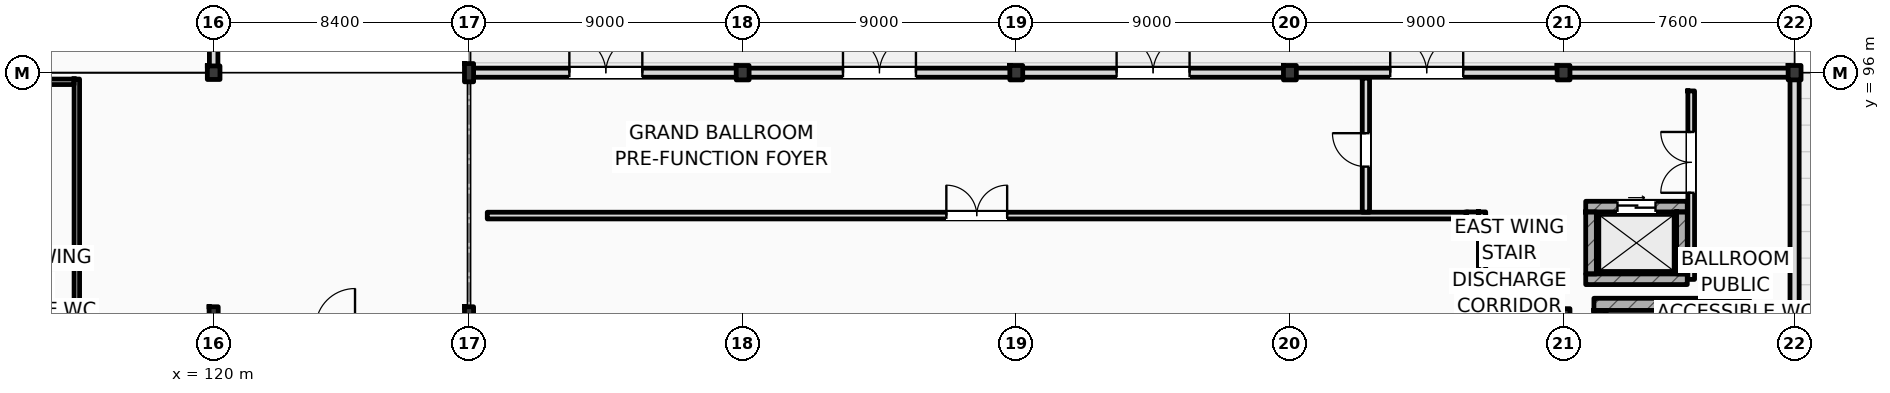
"""IFC4 building model, lengths in metres.
Left out: names, types, materials, properties, quantities, classifications, styles, units other than length and angle.
Written with IfcOpenShell. Run it as: python <this file> out.ifc"""

import sys

from ifc_helpers import new_model, si_unit, direction, frame, frame_2d, origin, origin_2d, place, context, subcontext, project, spatial, rectangle, i_section, extrude, element, fill, save


model = new_model("IFC4")
c1 = context("Model", 3, precision=1e-05, world=origin(), true_north=direction((0.0, 1.0)))
c2 = subcontext(c1, "Body", "Model", "MODEL_VIEW")
j1 = project(units=[si_unit("LENGTHUNIT", "METRE"), si_unit("PLANEANGLEUNIT", "RADIAN")], contexts=[c1])
p1 = place(None, origin())
s1 = spatial("IfcSite", under=j1, at=p1, CompositionType="ELEMENT")
p2 = place(p1, origin())
s2 = spatial("IfcBuilding", under=s1, at=p2, CompositionType="ELEMENT")
p3 = place(p2, origin())
s3 = spatial("IfcBuildingStorey", under=s2, at=p3, CompositionType="ELEMENT", Elevation=0.0)
p4 = place(p3, frame((120.0, 96.0, 0.0), z_axis=(0.0, 0.0, 1.0), x_axis=(1.0, 0.0, 0.0)))
e1 = element("IfcColumn", 1, at=p4, inside=s3, PredefinedType="COLUMN", context=c2, shape_type="SweptSolid", body=[
    extrude(i_section(OverallWidth=0.416, OverallDepth=0.446, WebThickness=0.036, FlangeThickness=0.048, FilletRadius=0.015, at=origin_2d()), origin(), (0.0, 0.0, 1.0), 6.0),
])
for number, where, z_axis, x_axis in (
    (2, (120.0, 88.0, 0.0), (0.0, 0.0, 1.0), (1.0, 0.0, 0.0)),
    (3, (128.4, 88.0, 0.0), (0.0, 0.0, 1.0), (1.0, 0.0, 0.0)),
    (4, (128.4, 96.0, 0.0), (0.0, 0.0, 1.0), (1.0, 0.0, 0.0)),
):
    element("IfcColumn", number, at=place(p3, frame(where, z_axis=z_axis, x_axis=x_axis)), inside=s3, PredefinedType="COLUMN", context=c2, shape_type="SweptSolid", body=[
        extrude(i_section(OverallWidth=0.3, OverallDepth=0.6, WebThickness=0.015, FlangeThickness=0.03, FilletRadius=0.027, at=origin_2d()), origin(), (0.0, 0.0, 1.0), 6.0),
    ])
for number, where, z_axis, x_axis in (
    (5, (164.4, 88.0, 0.0), (0.0, 0.0, 1.0), (1.0, 0.0, 0.0)),
    (6, (164.4, 96.0, 0.0), (0.0, 0.0, 1.0), (1.0, 0.0, 0.0)),
    (7, (172.0, 88.0, 0.0), (0.0, 0.0, 1.0), (1.0, 0.0, 0.0)),
    (8, (172.0, 96.0, 0.0), (0.0, 0.0, 1.0), (1.0, 0.0, 0.0)),
    (9, (137.4, 96.0, 0.0), (0.0, 0.0, 1.0), (1.0, 0.0, 0.0)),
    (10, (146.4, 96.0, 0.0), (0.0, 0.0, 1.0), (1.0, 0.0, 0.0)),
    (11, (155.4, 96.0, 0.0), (0.0, 0.0, 1.0), (1.0, 0.0, 0.0)),
):
    element("IfcColumn", number, at=place(p3, frame(where, z_axis=z_axis, x_axis=x_axis)), inside=s3, PredefinedType="COLUMN", context=c2, shape_type="SweptSolid", body=[
        extrude(i_section(OverallWidth=0.424, OverallDepth=0.474, WebThickness=0.045, FlangeThickness=0.055, FilletRadius=0.015, at=origin_2d()), origin(), (0.0, 0.0, 1.0), 6.0),
    ])
p5 = place(p3, frame((165.4, 88.38, 0.0), z_axis=(0.0, 0.0, 1.0), x_axis=(1.0, 0.0, 0.0)))
e12 = element("IfcWall", 12, at=p5, inside=s3, PredefinedType="SHEAR", context=c2, shape_type="SweptSolid", body=[
    extrude(rectangle(XDim=5.1, YDim=0.4, at=frame_2d((2.55, 0.0))), origin(), (0.0, 0.0, 1.0), 6.0),
])
p6 = place(p3, frame((165.6, 79.6, 0.0), z_axis=(0.0, 0.0, 1.0), x_axis=(0.0, 1.0, 0.0)))
e13 = element("IfcWall", 13, at=p6, inside=s3, PredefinedType="SHEAR", context=c2, shape_type="SweptSolid", body=[
    extrude(rectangle(XDim=8.58, YDim=0.4, at=frame_2d((4.29, 0.0))), origin(), (0.0, 0.0, 1.0), 6.0),
])
p7 = place(p6, frame((0.225, 0.0, 0.0)))
e14 = element("IfcOpeningElement", 14, at=p7, cuts=e13, PredefinedType="OPENING", context=c2, shape_type="SweptSolid", body=[
    extrude(rectangle(XDim=1.6, YDim=2.2, at=frame_2d((0.8, 1.1))), frame((0.0, 0.21, 0.0), z_axis=(0.0, -1.0, 0.0), x_axis=(1.0, 0.0, 0.0)), (0.0, 0.0, 1.0), 0.42),
])
p8 = place(p3, frame((170.3, 79.6, 0.0), z_axis=(0.0, 0.0, 1.0), x_axis=(0.0, 1.0, 0.0)))
e15 = element("IfcWall", 15, at=p8, inside=s3, PredefinedType="SHEAR", context=c2, shape_type="SweptSolid", body=[
    extrude(rectangle(XDim=8.58, YDim=0.4, at=frame_2d((4.29, 0.0))), origin(), (0.0, 0.0, 1.0), 6.0),
])
p9 = place(p3, frame((128.4, 96.0, 0.0), z_axis=(0.0, 0.0, 1.0), x_axis=(1.0, 0.0, 0.0)))
e16 = element("IfcWall", 16, at=p9, inside=s3, PredefinedType="STANDARD", context=c2, shape_type="SweptSolid", body=[
    extrude(rectangle(XDim=9.0, YDim=0.3, at=frame_2d((4.5, 0.0))), origin(), (0.0, 0.0, 1.0), 5.09),
])
p10 = place(p9, frame((3.3, 0.0, 0.0)))
e17 = element("IfcOpeningElement", 17, at=p10, cuts=e16, PredefinedType="OPENING", context=c2, shape_type="SweptSolid", body=[
    extrude(rectangle(XDim=2.4, YDim=2.6, at=frame_2d((1.2, 1.3))), frame((0.0, 0.16, 0.0), z_axis=(0.0, -1.0, 0.0), x_axis=(1.0, 0.0, 0.0)), (0.0, 0.0, 1.0), 0.32),
])
p11 = place(p3, frame((137.4, 96.0, 0.0), z_axis=(0.0, 0.0, 1.0), x_axis=(1.0, 0.0, 0.0)))
e18 = element("IfcWall", 18, at=p11, inside=s3, PredefinedType="STANDARD", context=c2, shape_type="SweptSolid", body=[
    extrude(rectangle(XDim=9.0, YDim=0.3, at=frame_2d((4.5, 0.0))), origin(), (0.0, 0.0, 1.0), 5.09),
])
p12 = place(p11, frame((3.3, 0.0, 0.0)))
e19 = element("IfcOpeningElement", 19, at=p12, cuts=e18, PredefinedType="OPENING", context=c2, shape_type="SweptSolid", body=[
    extrude(rectangle(XDim=2.4, YDim=2.6, at=frame_2d((1.2, 1.3))), frame((0.0, 0.16, 0.0), z_axis=(0.0, -1.0, 0.0), x_axis=(1.0, 0.0, 0.0)), (0.0, 0.0, 1.0), 0.32),
])
p13 = place(p3, frame((146.4, 96.0, 0.0), z_axis=(0.0, 0.0, 1.0), x_axis=(1.0, 0.0, 0.0)))
e20 = element("IfcWall", 20, at=p13, inside=s3, PredefinedType="STANDARD", context=c2, shape_type="SweptSolid", body=[
    extrude(rectangle(XDim=9.0, YDim=0.3, at=frame_2d((4.5, 0.0))), origin(), (0.0, 0.0, 1.0), 5.09),
])
p14 = place(p13, frame((3.3, 0.0, 0.0)))
e21 = element("IfcOpeningElement", 21, at=p14, cuts=e20, PredefinedType="OPENING", context=c2, shape_type="SweptSolid", body=[
    extrude(rectangle(XDim=2.4, YDim=2.6, at=frame_2d((1.2, 1.3))), frame((0.0, 0.16, 0.0), z_axis=(0.0, -1.0, 0.0), x_axis=(1.0, 0.0, 0.0)), (0.0, 0.0, 1.0), 0.32),
])
p15 = place(p3, frame((155.4, 96.0, 0.0), z_axis=(0.0, 0.0, 1.0), x_axis=(1.0, 0.0, 0.0)))
e22 = element("IfcWall", 22, at=p15, inside=s3, PredefinedType="STANDARD", context=c2, shape_type="SweptSolid", body=[
    extrude(rectangle(XDim=9.0, YDim=0.3, at=frame_2d((4.5, 0.0))), origin(), (0.0, 0.0, 1.0), 5.09),
])
p16 = place(p15, frame((3.3, 0.0, 0.0)))
e23 = element("IfcOpeningElement", 23, at=p16, cuts=e22, PredefinedType="OPENING", context=c2, shape_type="SweptSolid", body=[
    extrude(rectangle(XDim=2.4, YDim=2.6, at=frame_2d((1.2, 1.3))), frame((0.0, 0.16, 0.0), z_axis=(0.0, -1.0, 0.0), x_axis=(1.0, 0.0, 0.0)), (0.0, 0.0, 1.0), 0.32),
])
p17 = place(p3, frame((164.4, 96.0, 0.0), z_axis=(0.0, 0.0, 1.0), x_axis=(1.0, 0.0, 0.0)))
e24 = element("IfcWall", 24, at=p17, inside=s3, PredefinedType="STANDARD", context=c2, shape_type="SweptSolid", body=[
    extrude(rectangle(XDim=7.6, YDim=0.3, at=frame_2d((3.8, 0.0))), origin(), (0.0, 0.0, 1.0), 5.19),
])
p18 = place(p3, frame((172.0, 88.0, 0.0), z_axis=(0.0, 0.0, 1.0), x_axis=(0.0, 1.0, 0.0)))
e25 = element("IfcWall", 25, at=p18, inside=s3, PredefinedType="STANDARD", context=c2, shape_type="SweptSolid", body=[
    extrude(rectangle(XDim=8.0, YDim=0.3, at=frame_2d((4.0, 0.0))), origin(), (0.0, 0.0, 1.0), 5.24),
])
p19 = place(p3, frame((120.0, 96.0, 0.0), z_axis=(0.0, 0.0, 1.0), x_axis=(0.0, 1.0, 0.0)))
e26 = element("IfcWall", 26, at=p19, inside=s3, PredefinedType="STANDARD", context=c2, shape_type="SweptSolid", body=[
    extrude(rectangle(XDim=22.0, YDim=0.28, at=frame_2d((11.0, 0.0))), origin(), (0.0, 0.0, 1.0), 5.24),
])
p20 = place(p3, frame((165.13, 91.595, 0.0), z_axis=(0.0, 0.0, 1.0), x_axis=(1.0, 0.0, 0.0)))
e27 = element("IfcWall", 27, at=p20, inside=s3, PredefinedType="SHEAR", context=c2, shape_type="SweptSolid", body=[
    extrude(rectangle(XDim=3.34, YDim=0.35, at=frame_2d((1.67, 0.0))), origin(), (0.0, 0.0, 1.0), 5.7),
])
p21 = place(p20, frame((1.045, 0.0, 0.0)))
e28 = element("IfcOpeningElement", 28, at=p21, cuts=e27, PredefinedType="OPENING", context=c2, shape_type="SweptSolid", body=[
    extrude(rectangle(XDim=1.25, YDim=2.25, at=frame_2d((0.625, 1.125))), frame((0.0, 0.185, 0.0), z_axis=(0.0, -1.0, 0.0), x_axis=(1.0, 0.0, 0.0)), (0.0, 0.0, 1.0), 0.37),
])
p22 = place(p3, frame((165.13, 89.205, 0.0), z_axis=(0.0, 0.0, 1.0), x_axis=(1.0, 0.0, 0.0)))
e29 = element("IfcWall", 29, at=p22, inside=s3, PredefinedType="SHEAR", context=c2, shape_type="SweptSolid", body=[
    extrude(rectangle(XDim=3.34, YDim=0.35, at=frame_2d((1.67, 0.0))), origin(), (0.0, 0.0, 1.0), 5.7),
])
for number, where, z_axis, x_axis in (
    (30, (165.305, 89.38, 0.0), (0.0, 0.0, 1.0), (0.0, 1.0, 0.0)),
    (31, (168.295, 89.38, 0.0), (0.0, 0.0, 1.0), (0.0, 1.0, 0.0)),
):
    element("IfcWall", number, at=place(p3, frame(where, z_axis=z_axis, x_axis=x_axis)), inside=s3, PredefinedType="SHEAR", context=c2, shape_type="SweptSolid", body=[
        extrude(rectangle(XDim=2.04, YDim=0.35, at=frame_2d((1.02, 0.0))), origin(), (0.0, 0.0, 1.0), 5.7),
    ])
p23 = place(p3, frame((129.0, 91.3, 0.0), z_axis=(0.0, 0.0, 1.0), x_axis=(1.0, 0.0, 0.0)))
e32 = element("IfcWall", 32, at=p23, inside=s3, PredefinedType="PARTITIONING", context=c2, shape_type="SweptSolid", body=[
    extrude(rectangle(XDim=32.2, YDim=0.22, at=frame_2d((16.1, 0.0))), origin(), (0.0, 0.0, 1.0), 5.7),
])
p24 = place(p23, frame((15.1, 0.0, 0.0)))
e33 = element("IfcOpeningElement", 33, at=p24, cuts=e32, PredefinedType="OPENING", context=c2, shape_type="SweptSolid", body=[
    extrude(rectangle(XDim=2.0, YDim=2.35, at=frame_2d((1.0, 1.175))), frame((0.0, 0.12, 0.0), z_axis=(0.0, -1.0, 0.0), x_axis=(1.0, 0.0, 0.0)), (0.0, 0.0, 1.0), 0.24),
])
p25 = place(p3, frame((168.6, 89.2, 0.0), z_axis=(0.0, 0.0, 1.0), x_axis=(0.0, 1.0, 0.0)))
e34 = element("IfcWall", 34, at=p25, inside=s3, PredefinedType="PARTITIONING", context=c2, shape_type="SweptSolid", body=[
    extrude(rectangle(XDim=6.2, YDim=0.22, at=frame_2d((3.1, 0.0))), origin(), (0.0, 0.0, 1.0), 5.7),
])
p26 = place(p25, frame((2.85, 0.0, 0.0)))
e35 = element("IfcOpeningElement", 35, at=p26, cuts=e34, PredefinedType="OPENING", context=c2, shape_type="SweptSolid", body=[
    extrude(rectangle(XDim=2.0, YDim=2.35, at=frame_2d((1.0, 1.175))), frame((0.0, 0.12, 0.0), z_axis=(0.0, -1.0, 0.0), x_axis=(1.0, 0.0, 0.0)), (0.0, 0.0, 1.0), 0.24),
])
p27 = place(p3, frame((115.5, 87.81, 0.0), z_axis=(0.0, 0.0, 1.0), x_axis=(0.0, 1.0, 0.0)))
e36 = element("IfcWall", 36, at=p27, inside=s3, PredefinedType="PARTITIONING", context=c2, shape_type="SweptSolid", body=[
    extrude(rectangle(XDim=7.98, YDim=0.18, at=frame_2d((3.99, 0.0))), origin(), (0.0, 0.0, 1.0), 5.7),
])
p28 = place(p3, frame((111.88, 95.7, 0.0), z_axis=(0.0, 0.0, 1.0), x_axis=(1.0, 0.0, 0.0)))
e37 = element("IfcWall", 37, at=p28, inside=s3, PredefinedType="PARTITIONING", context=c2, shape_type="SweptSolid", body=[
    extrude(rectangle(XDim=3.53, YDim=0.18, at=frame_2d((1.765, 0.0))), origin(), (0.0, 0.0, 1.0), 5.7),
])
p29 = place(p3, frame((161.72, 79.4, 0.0), z_axis=(0.0, 0.0, 1.0), x_axis=(0.0, 1.0, 0.0)))
e38 = element("IfcWall", 38, at=p29, inside=s3, PredefinedType="STANDARD", context=c2, shape_type="SweptSolid", body=[
    extrude(rectangle(XDim=12.02, YDim=0.24, at=frame_2d((6.01, 0.0))), origin(), (0.0, 0.0, 1.0), 5.7),
])
p30 = place(p29, frame((4.8, 0.0, 0.0)))
e39 = element("IfcOpeningElement", 39, at=p30, cuts=e38, PredefinedType="OPENING", context=c2, shape_type="SweptSolid", body=[
    extrude(rectangle(XDim=1.6, YDim=2.2, at=frame_2d((0.8, 1.1))), frame((0.0, 0.13, 0.0), z_axis=(0.0, -1.0, 0.0), x_axis=(1.0, 0.0, 0.0)), (0.0, 0.0, 1.0), 0.26),
])
p31 = place(p3, frame((157.9, 91.41, 0.0), z_axis=(0.0, 0.0, 1.0), x_axis=(0.0, 1.0, 0.0)))
e40 = element("IfcWall", 40, at=p31, inside=s3, PredefinedType="STANDARD", context=c2, shape_type="SweptSolid", body=[
    extrude(rectangle(XDim=4.41, YDim=0.24, at=frame_2d((2.205, 0.0))), origin(), (0.0, 0.0, 1.0), 5.7),
])
p32 = place(p31, frame((1.5, 0.0, 0.0)))
e41 = element("IfcOpeningElement", 41, at=p32, cuts=e40, PredefinedType="OPENING", context=c2, shape_type="SweptSolid", body=[
    extrude(rectangle(XDim=1.1, YDim=2.2, at=frame_2d((0.55, 1.1))), frame((0.0, 0.13, 0.0), z_axis=(0.0, -1.0, 0.0), x_axis=(1.0, 0.0, 0.0)), (0.0, 0.0, 1.0), 0.26),
])
p33 = place(p3, frame((161.2, 91.3, 0.0), z_axis=(0.0, 0.0, 1.0), x_axis=(1.0, 0.0, 0.0)))
e42 = element("IfcWall", 42, at=p33, inside=s3, PredefinedType="STANDARD", context=c2, shape_type="SweptSolid", body=[
    extrude(rectangle(XDim=0.4, YDim=0.24, at=frame_2d((0.2, 0.0))), origin(), (0.0, 0.0, 1.0), 5.7),
])
p34 = place(p10, origin())
e43 = element("IfcDoor", 43, at=p34, inside=s3, OperationType="DOUBLE_SWING_LEFT", PredefinedType="DOOR", context=c2, shape_type="SweptSolid", body=[
    extrude(rectangle(XDim=2.4, YDim=2.6, at=frame_2d((1.2, 1.3))), frame((0.0, 0.025, 0.0), z_axis=(0.0, -1.0, 0.0), x_axis=(1.0, 0.0, 0.0)), (0.0, 0.0, 1.0), 0.05),
])
fill(e17, e43)
p35 = place(p12, origin())
e44 = element("IfcDoor", 44, at=p35, inside=s3, OperationType="DOUBLE_SWING_LEFT", PredefinedType="DOOR", context=c2, shape_type="SweptSolid", body=[
    extrude(rectangle(XDim=2.4, YDim=2.6, at=frame_2d((1.2, 1.3))), frame((0.0, 0.025, 0.0), z_axis=(0.0, -1.0, 0.0), x_axis=(1.0, 0.0, 0.0)), (0.0, 0.0, 1.0), 0.05),
])
fill(e19, e44)
p36 = place(p14, origin())
e45 = element("IfcDoor", 45, at=p36, inside=s3, OperationType="DOUBLE_SWING_LEFT", PredefinedType="DOOR", context=c2, shape_type="SweptSolid", body=[
    extrude(rectangle(XDim=2.4, YDim=2.6, at=frame_2d((1.2, 1.3))), frame((0.0, 0.025, 0.0), z_axis=(0.0, -1.0, 0.0), x_axis=(1.0, 0.0, 0.0)), (0.0, 0.0, 1.0), 0.05),
])
fill(e21, e45)
p37 = place(p16, origin())
e46 = element("IfcDoor", 46, at=p37, inside=s3, OperationType="DOUBLE_SWING_LEFT", PredefinedType="DOOR", context=c2, shape_type="SweptSolid", body=[
    extrude(rectangle(XDim=2.4, YDim=2.6, at=frame_2d((1.2, 1.3))), frame((0.0, 0.025, 0.0), z_axis=(0.0, -1.0, 0.0), x_axis=(1.0, 0.0, 0.0)), (0.0, 0.0, 1.0), 0.05),
])
fill(e23, e46)
p38 = place(p21, origin())
e47 = element("IfcDoor", 47, at=p38, inside=s3, OperationType="SLIDING_TO_LEFT", PredefinedType="DOOR", context=c2, shape_type="SweptSolid", body=[
    extrude(rectangle(XDim=1.25, YDim=2.25, at=frame_2d((0.625, 1.125))), frame((0.0, 0.025, 0.0), z_axis=(0.0, -1.0, 0.0), x_axis=(1.0, 0.0, 0.0)), (0.0, 0.0, 1.0), 0.05),
])
fill(e28, e47)
p39 = place(p24, origin())
e48 = element("IfcDoor", 48, at=p39, inside=s3, OperationType="DOUBLE_SWING_LEFT", PredefinedType="DOOR", context=c2, shape_type="SweptSolid", body=[
    extrude(rectangle(XDim=2.0, YDim=2.35, at=frame_2d((1.0, 1.175))), frame((0.0, 0.025, 0.0), z_axis=(0.0, -1.0, 0.0), x_axis=(1.0, 0.0, 0.0)), (0.0, 0.0, 1.0), 0.05),
])
fill(e33, e48)
p40 = place(p26, origin())
e49 = element("IfcDoor", 49, at=p40, inside=s3, OperationType="DOUBLE_SWING_LEFT", PredefinedType="DOOR", context=c2, shape_type="SweptSolid", body=[
    extrude(rectangle(XDim=2.0, YDim=2.35, at=frame_2d((1.0, 1.175))), frame((0.0, 0.025, 0.0), z_axis=(0.0, -1.0, 0.0), x_axis=(1.0, 0.0, 0.0)), (0.0, 0.0, 1.0), 0.05),
])
fill(e35, e49)
p41 = place(p32, origin())
e50 = element("IfcDoor", 50, at=p41, inside=s3, OperationType="SINGLE_SWING_RIGHT", PredefinedType="DOOR", context=c2, shape_type="SweptSolid", body=[
    extrude(rectangle(XDim=1.1, YDim=2.2, at=frame_2d((0.55, 1.1))), frame((0.0, 0.025, 0.0), z_axis=(0.0, -1.0, 0.0), x_axis=(1.0, 0.0, 0.0)), (0.0, 0.0, 1.0), 0.05),
])
fill(e41, e50)
save(model, sys.argv[1])
